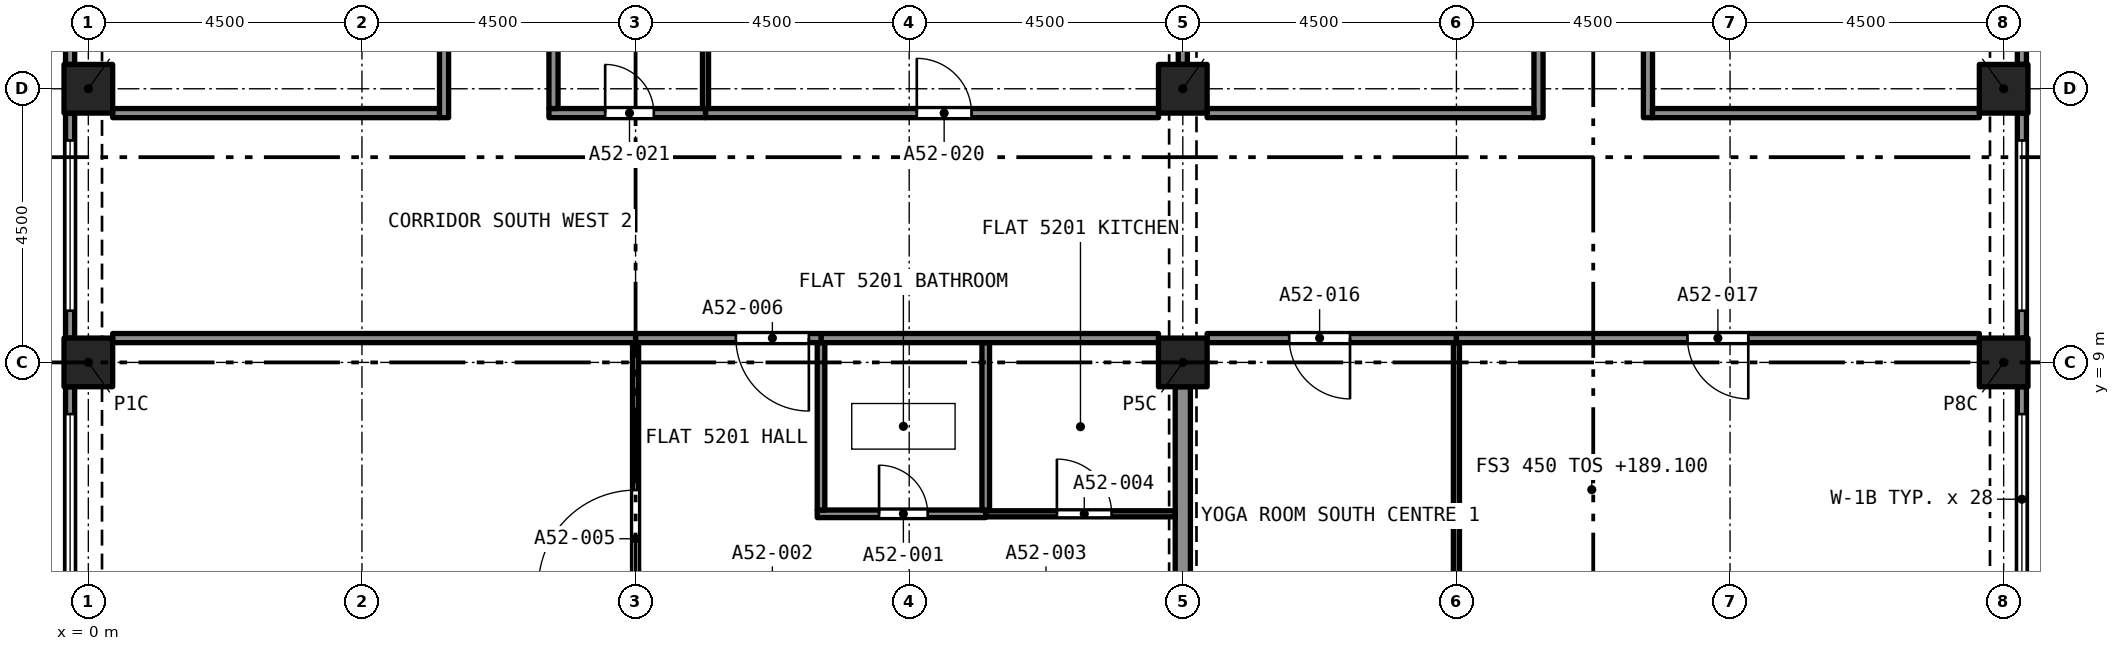
"""IFC4 building model, lengths in metres.
Left out: names, types, materials, properties, quantities, classifications, styles, units other than length and angle.
Written with IfcOpenShell. Run it as: python <this file> out.ifc"""

import sys

from ifc_helpers import new_model, si_unit, direction, frame, frame_2d, origin, origin_2d, place, context, subcontext, project, spatial, rectangle, extrude, element, fill, save


model = new_model("IFC4")
c1 = context("Model", 3, precision=1e-05, world=origin(), true_north=direction((0.0, 1.0)))
c2 = subcontext(c1, "Body", "Model", "MODEL_VIEW")
j1 = project(units=[si_unit("LENGTHUNIT", "METRE"), si_unit("PLANEANGLEUNIT", "RADIAN")], contexts=[c1])
p1 = place(None, origin())
s1 = spatial("IfcSite", under=j1, at=p1, CompositionType="ELEMENT")
p2 = place(p1, origin())
s2 = spatial("IfcBuilding", under=s1, at=p2, CompositionType="ELEMENT")
p3 = place(p2, frame((0.0, 0.0, 189.1)))
s3 = spatial("IfcBuildingStorey", under=s2, at=p3, CompositionType="ELEMENT", Elevation=189.1)
for number, where, z_axis, x_axis in (
    (1, (0.0, 9.0, 0.0), (0.0, 0.0, 1.0), (1.0, 0.0, 0.0)),
    (2, (18.0, 9.0, 0.0), (0.0, 0.0, 1.0), (1.0, 0.0, 0.0)),
    (3, (31.5, 9.0, 0.0), (0.0, 0.0, 1.0), (1.0, 0.0, 0.0)),
    (4, (0.0, 13.5, 0.0), (0.0, 0.0, 1.0), (1.0, 0.0, 0.0)),
    (5, (18.0, 13.5, 0.0), (0.0, 0.0, 1.0), (1.0, 0.0, 0.0)),
    (6, (31.5, 13.5, 0.0), (0.0, 0.0, 1.0), (1.0, 0.0, 0.0)),
):
    element("IfcColumn", number, at=place(p3, frame(where, z_axis=z_axis, x_axis=x_axis)), inside=s3, PredefinedType="COLUMN", context=c2, shape_type="SweptSolid", body=[
        extrude(rectangle(XDim=0.8, YDim=0.8, at=origin_2d()), origin(), (0.0, 0.0, 1.0), 3.2),
    ])
p4 = place(p3, frame((31.8, 8.6, 0.0), z_axis=(0.0, 0.0, 1.0), x_axis=(0.0, -1.0, 0.0)))
e7 = element("IfcWall", 7, at=p4, inside=s3, PredefinedType="SOLIDWALL", context=c2, shape_type="SweptSolid", body=[
    extrude(rectangle(XDim=3.7, YDim=0.15, at=frame_2d((1.85, 0.0))), origin(), (0.0, 0.0, 1.0), 3.2),
])
p5 = place(p4, frame((0.45, 0.0, 0.45)))
e8 = element("IfcOpeningElement", 8, at=p5, cuts=e7, PredefinedType="OPENING", context=c2, shape_type="SweptSolid", body=[
    extrude(rectangle(XDim=2.8, YDim=1.95, at=frame_2d((1.4, 0.975))), frame((0.0, 0.085, 0.0), z_axis=(0.0, -1.0, 0.0), x_axis=(1.0, 0.0, 0.0)), (0.0, 0.0, 1.0), 0.17),
])
p6 = place(p3, frame((31.8, 13.1, 0.0), z_axis=(0.0, 0.0, 1.0), x_axis=(0.0, -1.0, 0.0)))
e9 = element("IfcWall", 9, at=p6, inside=s3, PredefinedType="SOLIDWALL", context=c2, shape_type="SweptSolid", body=[
    extrude(rectangle(XDim=3.7, YDim=0.15, at=frame_2d((1.85, 0.0))), origin(), (0.0, 0.0, 1.0), 3.2),
])
p7 = place(p6, frame((0.45, 0.0, 0.45)))
e10 = element("IfcOpeningElement", 10, at=p7, cuts=e9, PredefinedType="OPENING", context=c2, shape_type="SweptSolid", body=[
    extrude(rectangle(XDim=2.8, YDim=1.95, at=frame_2d((1.4, 0.975))), frame((0.0, 0.085, 0.0), z_axis=(0.0, -1.0, 0.0), x_axis=(1.0, 0.0, 0.0)), (0.0, 0.0, 1.0), 0.17),
])
p8 = place(p3, frame((31.8, 17.6, 0.0), z_axis=(0.0, 0.0, 1.0), x_axis=(0.0, -1.0, 0.0)))
e11 = element("IfcWall", 11, at=p8, inside=s3, PredefinedType="SOLIDWALL", context=c2, shape_type="SweptSolid", body=[
    extrude(rectangle(XDim=3.7, YDim=0.15, at=frame_2d((1.85, 0.0))), origin(), (0.0, 0.0, 1.0), 3.2),
])
p9 = place(p8, frame((0.45, 0.0, 0.45)))
e12 = element("IfcOpeningElement", 12, at=p9, cuts=e11, PredefinedType="OPENING", context=c2, shape_type="SweptSolid", body=[
    extrude(rectangle(XDim=2.8, YDim=1.95, at=frame_2d((1.4, 0.975))), frame((0.0, 0.085, 0.0), z_axis=(0.0, -1.0, 0.0), x_axis=(1.0, 0.0, 0.0)), (0.0, 0.0, 1.0), 0.17),
])
p10 = place(p3, frame((-0.3, 13.9, 0.0), z_axis=(0.0, 0.0, 1.0), x_axis=(0.0, 1.0, 0.0)))
e13 = element("IfcWall", 13, at=p10, inside=s3, PredefinedType="SOLIDWALL", context=c2, shape_type="SweptSolid", body=[
    extrude(rectangle(XDim=3.7, YDim=0.15, at=frame_2d((1.85, 0.0))), origin(), (0.0, 0.0, 1.0), 3.2),
])
p11 = place(p10, frame((0.45, 0.0, 0.45)))
e14 = element("IfcOpeningElement", 14, at=p11, cuts=e13, PredefinedType="OPENING", context=c2, shape_type="SweptSolid", body=[
    extrude(rectangle(XDim=2.8, YDim=1.95, at=frame_2d((1.4, 0.975))), frame((0.0, 0.085, 0.0), z_axis=(0.0, -1.0, 0.0), x_axis=(1.0, 0.0, 0.0)), (0.0, 0.0, 1.0), 0.17),
])
p12 = place(p3, frame((-0.3, 9.4, 0.0), z_axis=(0.0, 0.0, 1.0), x_axis=(0.0, 1.0, 0.0)))
e15 = element("IfcWall", 15, at=p12, inside=s3, PredefinedType="SOLIDWALL", context=c2, shape_type="SweptSolid", body=[
    extrude(rectangle(XDim=3.7, YDim=0.15, at=frame_2d((1.85, 0.0))), origin(), (0.0, 0.0, 1.0), 3.2),
])
p13 = place(p12, frame((0.45, 0.0, 0.45)))
e16 = element("IfcOpeningElement", 16, at=p13, cuts=e15, PredefinedType="OPENING", context=c2, shape_type="SweptSolid", body=[
    extrude(rectangle(XDim=2.8, YDim=1.95, at=frame_2d((1.4, 0.975))), frame((0.0, 0.085, 0.0), z_axis=(0.0, -1.0, 0.0), x_axis=(1.0, 0.0, 0.0)), (0.0, 0.0, 1.0), 0.17),
])
p14 = place(p3, frame((-0.3, 4.9, 0.0), z_axis=(0.0, 0.0, 1.0), x_axis=(0.0, 1.0, 0.0)))
e17 = element("IfcWall", 17, at=p14, inside=s3, PredefinedType="SOLIDWALL", context=c2, shape_type="SweptSolid", body=[
    extrude(rectangle(XDim=3.7, YDim=0.15, at=frame_2d((1.85, 0.0))), origin(), (0.0, 0.0, 1.0), 3.2),
])
p15 = place(p14, frame((0.45, 0.0, 0.45)))
e18 = element("IfcOpeningElement", 18, at=p15, cuts=e17, PredefinedType="OPENING", context=c2, shape_type="SweptSolid", body=[
    extrude(rectangle(XDim=2.8, YDim=1.95, at=frame_2d((1.4, 0.975))), frame((0.0, 0.085, 0.0), z_axis=(0.0, -1.0, 0.0), x_axis=(1.0, 0.0, 0.0)), (0.0, 0.0, 1.0), 0.17),
])
p16 = place(p3, frame((11.988, 6.51, 0.0), z_axis=(0.0, 0.0, 1.0), x_axis=(1.0, 0.0, 0.0)))
e19 = element("IfcWall", 19, at=p16, inside=s3, PredefinedType="PARTITIONING", context=c2, shape_type="SweptSolid", body=[
    extrude(rectangle(XDim=2.771, YDim=0.125, at=frame_2d((1.385, 0.0))), origin(), (0.0, 0.0, 1.0), 2.9),
])
p17 = place(p16, frame((1.017, 0.0, 0.0)))
e20 = element("IfcOpeningElement", 20, at=p17, cuts=e19, PredefinedType="OPENING", context=c2, shape_type="SweptSolid", body=[
    extrude(rectangle(XDim=0.8, YDim=2.1, at=frame_2d((0.4, 1.05))), frame((0.0, 0.073, 0.0), z_axis=(0.0, -1.0, 0.0), x_axis=(1.0, 0.0, 0.0)), (0.0, 0.0, 1.0), 0.145),
])
for number, where, z_axis, x_axis in (
    (21, (12.05, 6.573, 0.0), (0.0, 0.0, 1.0), (0.0, 1.0, 0.0)),
    (22, (14.759, 6.573, 0.0), (0.0, 0.0, 1.0), (0.0, 1.0, 0.0)),
):
    element("IfcWall", number, at=place(p3, frame(where, z_axis=z_axis, x_axis=x_axis)), inside=s3, PredefinedType="PARTITIONING", context=c2, shape_type="SweptSolid", body=[
        extrude(rectangle(XDim=2.752, YDim=0.125, at=frame_2d((1.376, 0.0))), origin(), (0.0, 0.0, 1.0), 2.9),
    ])
p18 = place(p3, frame((12.05, 9.4, 0.0), z_axis=(0.0, 0.0, 1.0), x_axis=(1.0, 0.0, 0.0)))
e23 = element("IfcWall", 23, at=p18, inside=s3, PredefinedType="PARTITIONING", context=c2, shape_type="SweptSolid", body=[
    extrude(rectangle(XDim=5.55, YDim=0.15, at=frame_2d((2.775, 0.0))), origin(), (0.0, 0.0, 1.0), 2.9),
])
p19 = place(p3, frame((18.0, 4.9, 0.0), z_axis=(0.0, 0.0, 1.0), x_axis=(0.0, 1.0, 0.0)))
e24 = element("IfcWall", 24, at=p19, inside=s3, PredefinedType="PARTITIONING", context=c2, shape_type="SweptSolid", body=[
    extrude(rectangle(XDim=3.7, YDim=0.25, at=frame_2d((1.85, 0.0))), origin(), (0.0, 0.0, 1.0), 2.38),
])
p20 = place(p3, frame((14.759, 6.51, 0.0), z_axis=(0.0, 0.0, 1.0), x_axis=(1.0, 0.0, 0.0)))
e25 = element("IfcWall", 25, at=p20, inside=s3, PredefinedType="PARTITIONING", context=c2, shape_type="SweptSolid", body=[
    extrude(rectangle(XDim=3.116, YDim=0.1, at=frame_2d((1.558, 0.0))), origin(), (0.0, 0.0, 1.0), 2.9),
])
p21 = place(p20, frame((1.171, 0.0, 0.0)))
e26 = element("IfcOpeningElement", 26, at=p21, cuts=e25, PredefinedType="OPENING", context=c2, shape_type="SweptSolid", body=[
    extrude(rectangle(XDim=0.9, YDim=2.1, at=frame_2d((0.45, 1.05))), frame((0.0, 0.06, 0.0), z_axis=(0.0, -1.0, 0.0), x_axis=(1.0, 0.0, 0.0)), (0.0, 0.0, 1.0), 0.12),
])
p22 = place(p3, frame((9.0, 5.17, 0.0), z_axis=(0.0, 0.0, 1.0), x_axis=(0.0, 1.0, 0.0)))
e27 = element("IfcWall", 27, at=p22, inside=s3, PredefinedType="PARTITIONING", context=c2, shape_type="SweptSolid", body=[
    extrude(rectangle(XDim=4.155, YDim=0.1, at=frame_2d((2.078, 0.0))), origin(), (0.0, 0.0, 1.0), 2.9),
])
p23 = place(p22, frame((0.13, 0.0, 0.0)))
e28 = element("IfcOpeningElement", 28, at=p23, cuts=e27, PredefinedType="OPENING", context=c2, shape_type="SweptSolid", body=[
    extrude(rectangle(XDim=1.6, YDim=2.1, at=frame_2d((0.8, 1.05))), frame((0.0, 0.06, 0.0), z_axis=(0.0, -1.0, 0.0), x_axis=(1.0, 0.0, 0.0)), (0.0, 0.0, 1.0), 0.12),
])
p24 = place(p3, frame((12.05, 9.4, 0.0), z_axis=(0.0, 0.0, 1.0), x_axis=(-1.0, 0.0, 0.0)))
e29 = element("IfcWall", 29, at=p24, inside=s3, PredefinedType="PARTITIONING", context=c2, shape_type="SweptSolid", body=[
    extrude(rectangle(XDim=3.05, YDim=0.15, at=frame_2d((1.525, 0.0))), origin(), (0.0, 0.0, 1.0), 2.9),
])
p25 = place(p24, frame((0.2, 0.0, 0.0)))
e30 = element("IfcOpeningElement", 30, at=p25, cuts=e29, PredefinedType="OPENING", context=c2, shape_type="SweptSolid", body=[
    extrude(rectangle(XDim=1.2, YDim=2.4, at=frame_2d((0.6, 1.2))), frame((0.0, 0.085, 0.0), z_axis=(0.0, -1.0, 0.0), x_axis=(1.0, 0.0, 0.0)), (0.0, 0.0, 1.0), 0.17),
])
p26 = place(p3, frame((0.4, 9.4, 0.0), z_axis=(0.0, 0.0, 1.0), x_axis=(1.0, 0.0, 0.0)))
e31 = element("IfcWall", 31, at=p26, inside=s3, PredefinedType="PARTITIONING", context=c2, shape_type="SweptSolid", body=[
    extrude(rectangle(XDim=8.6, YDim=0.15, at=frame_2d((4.3, 0.0))), origin(), (0.0, 0.0, 1.0), 2.9),
])
p27 = place(p3, frame((22.5, 0.4, 0.0), z_axis=(0.0, 0.0, 1.0), x_axis=(0.0, 1.0, 0.0)))
e32 = element("IfcWall", 32, at=p27, inside=s3, PredefinedType="PARTITIONING", context=c2, shape_type="SweptSolid", body=[
    extrude(rectangle(XDim=8.925, YDim=0.1, at=frame_2d((4.462, 0.0))), origin(), (0.0, 0.0, 1.0), 2.75),
])
p28 = place(p3, frame((22.5, 9.4, 0.0), z_axis=(0.0, 0.0, 1.0), x_axis=(-1.0, 0.0, 0.0)))
e33 = element("IfcWall", 33, at=p28, inside=s3, PredefinedType="PARTITIONING", context=c2, shape_type="SweptSolid", body=[
    extrude(rectangle(XDim=4.1, YDim=0.15, at=frame_2d((2.05, 0.0))), origin(), (0.0, 0.0, 1.0), 2.75),
])
p29 = place(p28, frame((1.75, 0.0, 0.0)))
e34 = element("IfcOpeningElement", 34, at=p29, cuts=e33, PredefinedType="OPENING", context=c2, shape_type="SweptSolid", body=[
    extrude(rectangle(XDim=1.0, YDim=2.1, at=frame_2d((0.5, 1.05))), frame((0.0, 0.085, 0.0), z_axis=(0.0, -1.0, 0.0), x_axis=(1.0, 0.0, 0.0)), (0.0, 0.0, 1.0), 0.17),
])
p30 = place(p3, frame((31.1, 9.4, 0.0), z_axis=(0.0, 0.0, 1.0), x_axis=(-1.0, 0.0, 0.0)))
e35 = element("IfcWall", 35, at=p30, inside=s3, PredefinedType="PARTITIONING", context=c2, shape_type="SweptSolid", body=[
    extrude(rectangle(XDim=8.6, YDim=0.15, at=frame_2d((4.3, 0.0))), origin(), (0.0, 0.0, 1.0), 2.75),
])
p31 = place(p30, frame((3.8, 0.0, 0.0)))
e36 = element("IfcOpeningElement", 36, at=p31, cuts=e35, PredefinedType="OPENING", context=c2, shape_type="SweptSolid", body=[
    extrude(rectangle(XDim=1.0, YDim=2.1, at=frame_2d((0.5, 1.05))), frame((0.0, 0.085, 0.0), z_axis=(0.0, -1.0, 0.0), x_axis=(1.0, 0.0, 0.0)), (0.0, 0.0, 1.0), 0.17),
])
p32 = place(p3, frame((23.85, 13.025, 0.0), z_axis=(0.0, 0.0, 1.0), x_axis=(0.0, 1.0, 0.0)))
e37 = element("IfcWall", 37, at=p32, inside=s3, PredefinedType="PARTITIONING", context=c2, shape_type="SweptSolid", body=[
    extrude(rectangle(XDim=9.55, YDim=0.15, at=frame_2d((4.775, 0.0))), origin(), (0.0, 0.0, 1.0), 2.75),
])
p33 = place(p32, frame((4.275, 0.0, 0.0)))
e38 = element("IfcOpeningElement", 38, at=p33, cuts=e37, PredefinedType="OPENING", context=c2, shape_type="SweptSolid", body=[
    extrude(rectangle(XDim=1.0, YDim=2.1, at=frame_2d((0.5, 1.05))), frame((0.0, 0.085, 0.0), z_axis=(0.0, -1.0, 0.0), x_axis=(1.0, 0.0, 0.0)), (0.0, 0.0, 1.0), 0.17),
])
p34 = place(p3, frame((25.65, 22.575, 0.0), z_axis=(0.0, 0.0, 1.0), x_axis=(0.0, -1.0, 0.0)))
e39 = element("IfcWall", 39, at=p34, inside=s3, PredefinedType="PARTITIONING", context=c2, shape_type="SweptSolid", body=[
    extrude(rectangle(XDim=9.55, YDim=0.15, at=frame_2d((4.775, 0.0))), origin(), (0.0, 0.0, 1.0), 2.75),
])
p35 = place(p34, frame((4.275, 0.0, 0.0)))
e40 = element("IfcOpeningElement", 40, at=p35, cuts=e39, PredefinedType="OPENING", context=c2, shape_type="SweptSolid", body=[
    extrude(rectangle(XDim=1.0, YDim=2.1, at=frame_2d((0.5, 1.05))), frame((0.0, 0.085, 0.0), z_axis=(0.0, -1.0, 0.0), x_axis=(1.0, 0.0, 0.0)), (0.0, 0.0, 1.0), 0.17),
])
for number, where, z_axis, x_axis in (
    (41, (18.4, 13.1, 0.0), (0.0, 0.0, 1.0), (1.0, 0.0, 0.0)),
    (42, (25.725, 13.1, 0.0), (0.0, 0.0, 1.0), (1.0, 0.0, 0.0)),
):
    element("IfcWall", number, at=place(p3, frame(where, z_axis=z_axis, x_axis=x_axis)), inside=s3, PredefinedType="PARTITIONING", context=c2, shape_type="SweptSolid", body=[
        extrude(rectangle(XDim=5.375, YDim=0.15, at=frame_2d((2.688, 0.0))), origin(), (0.0, 0.0, 1.0), 2.75),
    ])
p36 = place(p3, frame((10.15, 13.1, 0.0), z_axis=(0.0, 0.0, 1.0), x_axis=(1.0, 0.0, 0.0)))
e43 = element("IfcWall", 43, at=p36, inside=s3, PredefinedType="PARTITIONING", context=c2, shape_type="SweptSolid", body=[
    extrude(rectangle(XDim=7.45, YDim=0.15, at=frame_2d((3.725, 0.0))), origin(), (0.0, 0.0, 1.0), 2.9),
])
p37 = place(p36, frame((3.475, 0.0, 0.0)))
e44 = element("IfcOpeningElement", 44, at=p37, cuts=e43, PredefinedType="OPENING", context=c2, shape_type="SweptSolid", body=[
    extrude(rectangle(XDim=0.9, YDim=2.1, at=frame_2d((0.45, 1.05))), frame((0.0, 0.085, 0.0), z_axis=(0.0, -1.0, 0.0), x_axis=(1.0, 0.0, 0.0)), (0.0, 0.0, 1.0), 0.17),
])
p38 = place(p3, frame((7.575, 13.1, 0.0), z_axis=(0.0, 0.0, 1.0), x_axis=(1.0, 0.0, 0.0)))
e45 = element("IfcWall", 45, at=p38, inside=s3, PredefinedType="PARTITIONING", context=c2, shape_type="SweptSolid", body=[
    extrude(rectangle(XDim=2.575, YDim=0.15, at=frame_2d((1.288, 0.0))), origin(), (0.0, 0.0, 1.0), 2.9),
])
p39 = place(p38, frame((0.925, 0.0, 0.0)))
e46 = element("IfcOpeningElement", 46, at=p39, cuts=e45, PredefinedType="OPENING", context=c2, shape_type="SweptSolid", body=[
    extrude(rectangle(XDim=0.8, YDim=2.1, at=frame_2d((0.4, 1.05))), frame((0.0, 0.085, 0.0), z_axis=(0.0, -1.0, 0.0), x_axis=(1.0, 0.0, 0.0)), (0.0, 0.0, 1.0), 0.17),
])
p40 = place(p3, frame((0.4, 13.1, 0.0), z_axis=(0.0, 0.0, 1.0), x_axis=(1.0, 0.0, 0.0)))
e47 = element("IfcWall", 47, at=p40, inside=s3, PredefinedType="PARTITIONING", context=c2, shape_type="SweptSolid", body=[
    extrude(rectangle(XDim=5.375, YDim=0.15, at=frame_2d((2.688, 0.0))), origin(), (0.0, 0.0, 1.0), 2.9),
])
p41 = place(p3, frame((18.0, 13.9, 0.0), z_axis=(0.0, 0.0, 1.0), x_axis=(0.0, 1.0, 0.0)))
e48 = element("IfcWall", 48, at=p41, inside=s3, PredefinedType="PARTITIONING", context=c2, shape_type="SweptSolid", body=[
    extrude(rectangle(XDim=3.4, YDim=0.15, at=frame_2d((1.7, 0.0))), origin(), (0.0, 0.0, 1.0), 2.38),
])
p42 = place(p3, frame((7.65, 13.175, 0.0), z_axis=(0.0, 0.0, 1.0), x_axis=(0.0, 1.0, 0.0)))
e49 = element("IfcWall", 49, at=p42, inside=s3, PredefinedType="PARTITIONING", context=c2, shape_type="SweptSolid", body=[
    extrude(rectangle(XDim=4.125, YDim=0.15, at=frame_2d((2.062, 0.0))), origin(), (0.0, 0.0, 1.0), 2.9),
])
p43 = place(p3, frame((5.85, 13.025, 0.0), z_axis=(0.0, 0.0, 1.0), x_axis=(0.0, 1.0, 0.0)))
e50 = element("IfcWall", 50, at=p43, inside=s3, PredefinedType="PARTITIONING", context=c2, shape_type="SweptSolid", body=[
    extrude(rectangle(XDim=9.475, YDim=0.15, at=frame_2d((4.738, 0.0))), origin(), (0.0, 0.0, 1.0), 2.9),
])
p44 = place(p43, frame((4.275, 0.0, 0.0)))
e51 = element("IfcOpeningElement", 51, at=p44, cuts=e50, PredefinedType="OPENING", context=c2, shape_type="SweptSolid", body=[
    extrude(rectangle(XDim=1.0, YDim=2.1, at=frame_2d((0.5, 1.05))), frame((0.0, 0.085, 0.0), z_axis=(0.0, -1.0, 0.0), x_axis=(1.0, 0.0, 0.0)), (0.0, 0.0, 1.0), 0.17),
])
p45 = place(p3, frame((10.15, 13.175, 0.0), z_axis=(0.0, 0.0, 1.0), x_axis=(0.0, 1.0, 0.0)))
e52 = element("IfcWall", 52, at=p45, inside=s3, PredefinedType="PARTITIONING", context=c2, shape_type="SweptSolid", body=[
    extrude(rectangle(XDim=4.05, YDim=0.1, at=frame_2d((2.025, 0.0))), origin(), (0.0, 0.0, 1.0), 2.9),
])
p46 = place(p5, origin())
e53 = element("IfcWindow", 53, at=p46, inside=s3, PartitioningType="SINGLE_PANEL", PredefinedType="WINDOW", context=c2, shape_type="SweptSolid", body=[
    extrude(rectangle(XDim=2.8, YDim=1.95, at=frame_2d((1.4, 0.975))), frame((0.0, 0.03, 0.0), z_axis=(0.0, -1.0, 0.0), x_axis=(1.0, 0.0, 0.0)), (0.0, 0.0, 1.0), 0.06),
])
fill(e8, e53)
p47 = place(p7, origin())
e54 = element("IfcWindow", 54, at=p47, inside=s3, PartitioningType="SINGLE_PANEL", PredefinedType="WINDOW", context=c2, shape_type="SweptSolid", body=[
    extrude(rectangle(XDim=2.8, YDim=1.95, at=frame_2d((1.4, 0.975))), frame((0.0, 0.03, 0.0), z_axis=(0.0, -1.0, 0.0), x_axis=(1.0, 0.0, 0.0)), (0.0, 0.0, 1.0), 0.06),
])
fill(e10, e54)
p48 = place(p13, origin())
e55 = element("IfcWindow", 55, at=p48, inside=s3, PartitioningType="SINGLE_PANEL", PredefinedType="WINDOW", context=c2, shape_type="SweptSolid", body=[
    extrude(rectangle(XDim=2.8, YDim=1.95, at=frame_2d((1.4, 0.975))), frame((0.0, 0.03, 0.0), z_axis=(0.0, -1.0, 0.0), x_axis=(1.0, 0.0, 0.0)), (0.0, 0.0, 1.0), 0.06),
])
fill(e16, e55)
p49 = place(p15, origin())
e56 = element("IfcWindow", 56, at=p49, inside=s3, PartitioningType="SINGLE_PANEL", PredefinedType="WINDOW", context=c2, shape_type="SweptSolid", body=[
    extrude(rectangle(XDim=2.8, YDim=1.95, at=frame_2d((1.4, 0.975))), frame((0.0, 0.03, 0.0), z_axis=(0.0, -1.0, 0.0), x_axis=(1.0, 0.0, 0.0)), (0.0, 0.0, 1.0), 0.06),
])
fill(e18, e56)
p50 = place(p17, origin())
e57 = element("IfcDoor", 57, at=p50, inside=s3, OperationType="SINGLE_SWING_RIGHT", PredefinedType="DOOR", context=c2, shape_type="SweptSolid", body=[
    extrude(rectangle(XDim=0.8, YDim=2.1, at=frame_2d((0.4, 1.05))), frame((0.0, 0.025, 0.0), z_axis=(0.0, -1.0, 0.0), x_axis=(1.0, 0.0, 0.0)), (0.0, 0.0, 1.0), 0.05),
])
fill(e20, e57)
p51 = place(p21, origin())
e58 = element("IfcDoor", 58, at=p51, inside=s3, OperationType="SINGLE_SWING_RIGHT", PredefinedType="DOOR", context=c2, shape_type="SweptSolid", body=[
    extrude(rectangle(XDim=0.9, YDim=2.1, at=frame_2d((0.45, 1.05))), frame((0.0, 0.025, 0.0), z_axis=(0.0, -1.0, 0.0), x_axis=(1.0, 0.0, 0.0)), (0.0, 0.0, 1.0), 0.05),
])
fill(e26, e58)
p52 = place(p23, origin())
e59 = element("IfcDoor", 59, at=p52, inside=s3, OperationType="SINGLE_SWING_LEFT", PredefinedType="DOOR", context=c2, shape_type="SweptSolid", body=[
    extrude(rectangle(XDim=1.6, YDim=2.1, at=frame_2d((0.8, 1.05))), frame((0.0, 0.025, 0.0), z_axis=(0.0, -1.0, 0.0), x_axis=(1.0, 0.0, 0.0)), (0.0, 0.0, 1.0), 0.05),
])
fill(e28, e59)
p53 = place(p25, origin())
e60 = element("IfcDoor", 60, at=p53, inside=s3, OperationType="SINGLE_SWING_LEFT", PredefinedType="DOOR", context=c2, shape_type="SweptSolid", body=[
    extrude(rectangle(XDim=1.2, YDim=2.4, at=frame_2d((0.6, 1.2))), frame((0.0, 0.025, 0.0), z_axis=(0.0, -1.0, 0.0), x_axis=(1.0, 0.0, 0.0)), (0.0, 0.0, 1.0), 0.05),
])
fill(e30, e60)
p54 = place(p29, origin())
e61 = element("IfcDoor", 61, at=p54, inside=s3, OperationType="SINGLE_SWING_RIGHT", PredefinedType="DOOR", context=c2, shape_type="SweptSolid", body=[
    extrude(rectangle(XDim=1.0, YDim=2.1, at=frame_2d((0.5, 1.05))), frame((0.0, 0.025, 0.0), z_axis=(0.0, -1.0, 0.0), x_axis=(1.0, 0.0, 0.0)), (0.0, 0.0, 1.0), 0.05),
])
fill(e34, e61)
p55 = place(p31, origin())
e62 = element("IfcDoor", 62, at=p55, inside=s3, OperationType="SINGLE_SWING_RIGHT", PredefinedType="DOOR", context=c2, shape_type="SweptSolid", body=[
    extrude(rectangle(XDim=1.0, YDim=2.1, at=frame_2d((0.5, 1.05))), frame((0.0, 0.025, 0.0), z_axis=(0.0, -1.0, 0.0), x_axis=(1.0, 0.0, 0.0)), (0.0, 0.0, 1.0), 0.05),
])
fill(e36, e62)
p56 = place(p37, origin())
e63 = element("IfcDoor", 63, at=p56, inside=s3, OperationType="SINGLE_SWING_RIGHT", PredefinedType="DOOR", context=c2, shape_type="SweptSolid", body=[
    extrude(rectangle(XDim=0.9, YDim=2.1, at=frame_2d((0.45, 1.05))), frame((0.0, 0.025, 0.0), z_axis=(0.0, -1.0, 0.0), x_axis=(1.0, 0.0, 0.0)), (0.0, 0.0, 1.0), 0.05),
])
fill(e44, e63)
p57 = place(p39, origin())
e64 = element("IfcDoor", 64, at=p57, inside=s3, OperationType="SINGLE_SWING_RIGHT", PredefinedType="DOOR", context=c2, shape_type="SweptSolid", body=[
    extrude(rectangle(XDim=0.8, YDim=2.1, at=frame_2d((0.4, 1.05))), frame((0.0, 0.025, 0.0), z_axis=(0.0, -1.0, 0.0), x_axis=(1.0, 0.0, 0.0)), (0.0, 0.0, 1.0), 0.05),
])
fill(e46, e64)
save(model, sys.argv[1])
